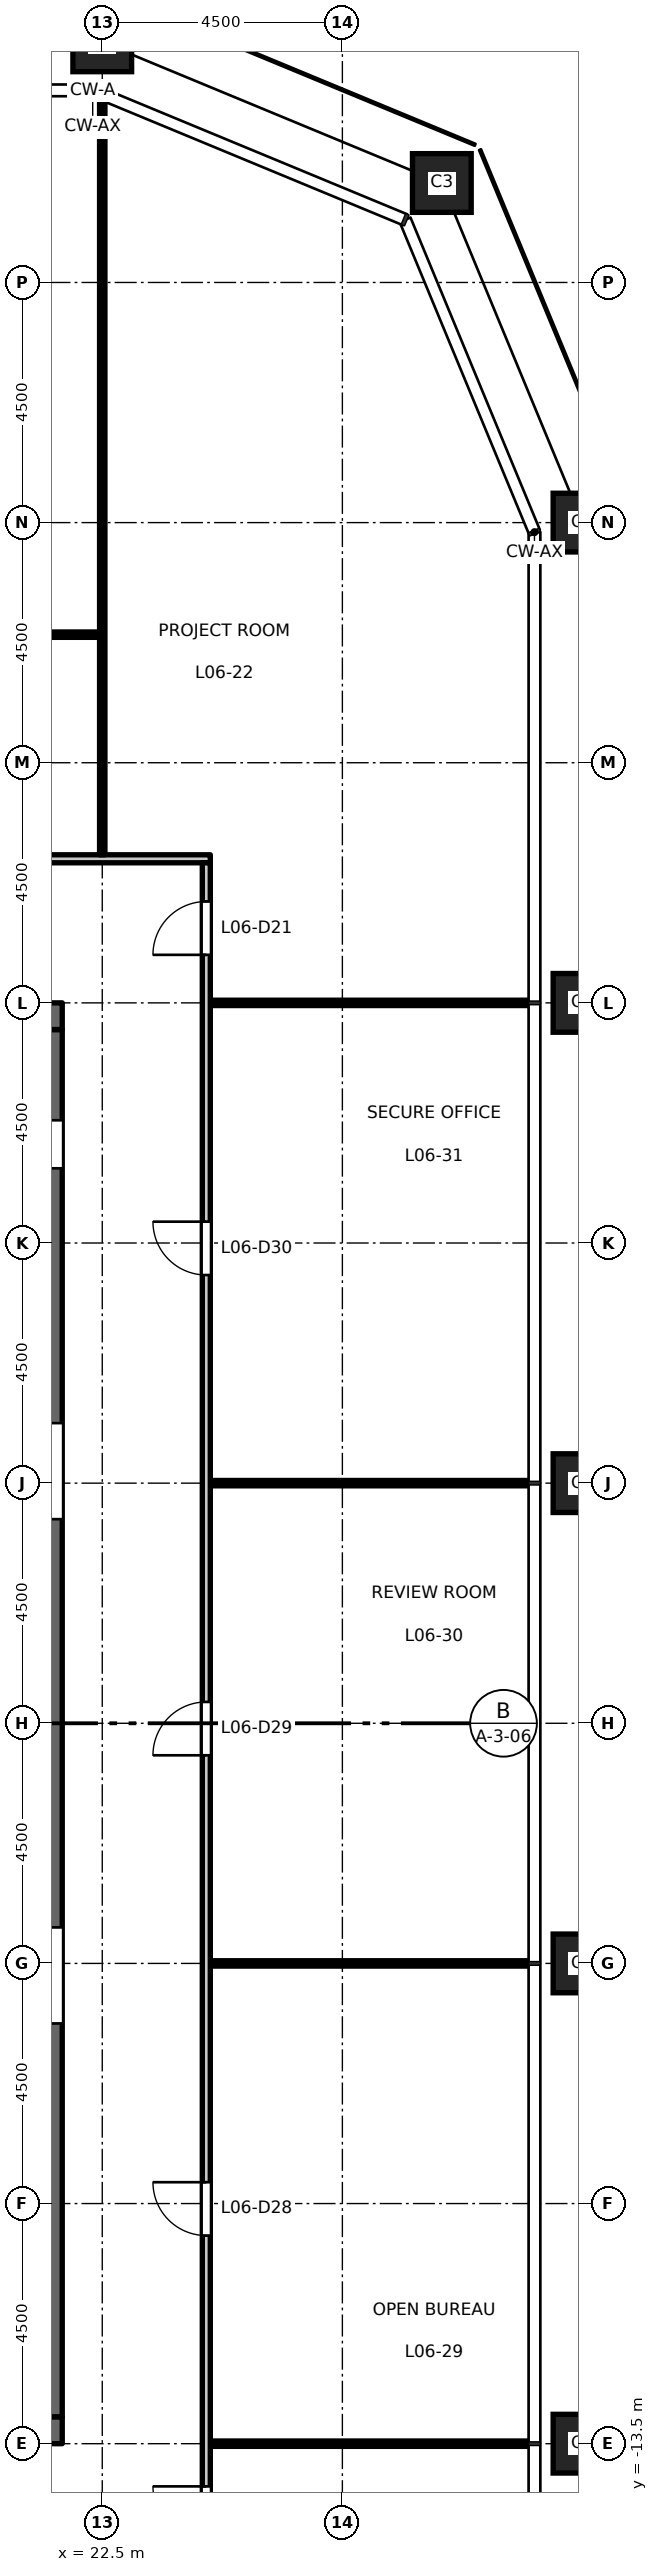
"""IFC4 building model, lengths in metres.
Left out: names, types, materials, properties, quantities, classifications, styles, units other than length and angle.
Written with IfcOpenShell. Run it as: python <this file> out.ifc"""

import sys

from ifc_helpers import new_model, si_unit, direction, frame, frame_2d, origin, origin_2d, place, context, subcontext, project, spatial, rectangle, hollow_rectangle, extrude, element, fill, save


model = new_model("IFC4")
c1 = context("Model", 3, precision=1e-05, world=origin(), true_north=direction((0.0, 1.0)))
c2 = subcontext(c1, "Body", "Model", "MODEL_VIEW")
j1 = project(units=[si_unit("LENGTHUNIT", "METRE"), si_unit("PLANEANGLEUNIT", "RADIAN")], contexts=[c1])
p1 = place(None, origin())
s1 = spatial("IfcSite", under=j1, at=p1, CompositionType="ELEMENT")
p2 = place(p1, origin())
s2 = spatial("IfcBuilding", under=s1, at=p2, CompositionType="ELEMENT")
p3 = place(p2, frame((0.0, 0.0, 31.2)))
s3 = spatial("IfcBuildingStorey", under=s2, at=p3, CompositionType="ELEMENT", Elevation=31.2)
for number, where, z_axis, x_axis in (
    (1, (31.5, -13.5, 0.0), (0.0, 0.0, 1.0), (1.0, 0.0, 0.0)),
    (2, (31.5, -4.5, 0.0), (0.0, 0.0, 1.0), (1.0, 0.0, 0.0)),
    (3, (31.5, 4.5, 0.0), (0.0, 0.0, 1.0), (1.0, 0.0, 0.0)),
    (4, (31.5, 13.5, 0.0), (0.0, 0.0, 1.0), (1.0, 0.0, 0.0)),
    (5, (31.5, 22.5, 0.0), (0.0, 0.0, 1.0), (1.0, 0.0, 0.0)),
    (6, (28.864, 28.864, 0.0), (0.0, 0.0, 1.0), (1.0, 0.0, 0.0)),
    (7, (22.5, 31.5, 0.0), (0.0, 0.0, 1.0), (1.0, 0.0, 0.0)),
):
    element("IfcColumn", number, at=place(p3, frame(where, z_axis=z_axis, x_axis=x_axis)), inside=s3, PredefinedType="COLUMN", context=c2, shape_type="SweptSolid", body=[
        extrude(hollow_rectangle(XDim=1.1, YDim=1.1, WallThickness=0.07, at=origin_2d()), origin(), (0.0, 0.0, 1.0), 4.5),
    ])
p4 = place(p3, frame((21.5, -13.0, 0.0), z_axis=(0.0, 0.0, 1.0), x_axis=(0.0, 1.0, 0.0)))
e8 = element("IfcWall", 8, at=p4, inside=s3, PredefinedType="SHEAR", context=c2, shape_type="SweptSolid", body=[
    extrude(rectangle(XDim=26.0, YDim=0.5, at=frame_2d((13.0, 0.0))), origin(), (0.0, 0.0, 1.0), 4.35),
])
p5 = place(p4, frame((16.825, 0.0, 0.0)))
e9 = element("IfcOpeningElement", 9, at=p5, cuts=e8, PredefinedType="OPENING", context=c2, shape_type="SweptSolid", body=[
    extrude(rectangle(XDim=1.8, YDim=2.1, at=frame_2d((0.9, 1.05))), frame((0.0, 0.26, 0.0), z_axis=(0.0, -1.0, 0.0), x_axis=(1.0, 0.0, 0.0)), (0.0, 0.0, 1.0), 0.52),
])
p6 = place(p4, frame((7.375, 0.0, 0.0)))
e10 = element("IfcOpeningElement", 10, at=p6, cuts=e8, PredefinedType="OPENING", context=c2, shape_type="SweptSolid", body=[
    extrude(rectangle(XDim=1.8, YDim=2.1, at=frame_2d((0.9, 1.05))), frame((0.0, 0.26, 0.0), z_axis=(0.0, -1.0, 0.0), x_axis=(1.0, 0.0, 0.0)), (0.0, 0.0, 1.0), 0.52),
])
p7 = place(p4, frame((23.4, 0.0, 0.0)))
e11 = element("IfcOpeningElement", 11, at=p7, cuts=e8, PredefinedType="OPENING", context=c2, shape_type="SweptSolid", body=[
    extrude(rectangle(XDim=0.9, YDim=2.1, at=frame_2d((0.45, 1.05))), frame((0.0, 0.26, 0.0), z_axis=(0.0, -1.0, 0.0), x_axis=(1.0, 0.0, 0.0)), (0.0, 0.0, 1.0), 0.52),
])
for number, where, z_axis, x_axis in (
    (12, (8.25, 13.25, 0.0), (0.0, 0.0, 1.0), (1.0, 0.0, 0.0)),
    (13, (8.25, -13.25, 0.0), (0.0, 0.0, 1.0), (1.0, 0.0, 0.0)),
):
    element("IfcWall", number, at=place(p3, frame(where, z_axis=z_axis, x_axis=x_axis)), inside=s3, PredefinedType="SHEAR", context=c2, shape_type="SweptSolid", body=[
        extrude(rectangle(XDim=13.5, YDim=0.5, at=frame_2d((6.75, 0.0))), origin(), (0.0, 0.0, 1.0), 4.35),
    ])
p8 = place(p3, frame((24.525, -13.5, 0.0), z_axis=(0.0, 0.0, 1.0), x_axis=(1.0, 0.0, 0.0)))
e14 = element("IfcWall", 14, at=p8, inside=s3, PredefinedType="PARTITIONING", context=c2, shape_type="SweptSolid", body=[
    extrude(rectangle(XDim=5.985, YDim=0.1, at=frame_2d((2.993, 0.0))), origin(), (0.0, 0.0, 1.0), 3.35),
])
for number, where, z_axis, x_axis in (
    (15, (24.525, -4.5, 0.0), (0.0, 0.0, 1.0), (1.0, 0.0, 0.0)),
    (16, (24.525, 4.5, 0.0), (0.0, 0.0, 1.0), (1.0, 0.0, 0.0)),
):
    element("IfcWall", number, at=place(p3, frame(where, z_axis=z_axis, x_axis=x_axis)), inside=s3, PredefinedType="PARTITIONING", context=c2, shape_type="SweptSolid", body=[
        extrude(rectangle(XDim=5.985, YDim=0.1, at=frame_2d((2.993, 0.0))), origin(), (0.0, 0.0, 1.0), 4.35),
    ])
p9 = place(p3, frame((24.525, 13.5, 0.0), z_axis=(0.0, 0.0, 1.0), x_axis=(1.0, 0.0, 0.0)))
e17 = element("IfcWall", 17, at=p9, inside=s3, PredefinedType="PARTITIONING", context=c2, shape_type="SweptSolid", body=[
    extrude(rectangle(XDim=5.985, YDim=0.1, at=frame_2d((2.993, 0.0))), origin(), (0.0, 0.0, 1.0), 3.35),
])
p10 = place(p3, frame((-24.525, 16.2, 0.0), z_axis=(0.0, 0.0, 1.0), x_axis=(1.0, 0.0, 0.0)))
e18 = element("IfcWall", 18, at=p10, inside=s3, PredefinedType="PARTITIONING", context=c2, shape_type="SweptSolid", body=[
    extrude(rectangle(XDim=49.05, YDim=0.15, at=frame_2d((24.525, 0.0))), origin(), (0.0, 0.0, 1.0), 4.35),
])
p11 = place(p10, frame((6.125, 0.0, 0.0)))
e19 = element("IfcOpeningElement", 19, at=p11, cuts=e18, PredefinedType="OPENING", context=c2, shape_type="SweptSolid", body=[
    extrude(rectangle(XDim=1.0, YDim=2.1, at=frame_2d((0.5, 1.05))), frame((0.0, 0.085, 0.0), z_axis=(0.0, -1.0, 0.0), x_axis=(1.0, 0.0, 0.0)), (0.0, 0.0, 1.0), 0.17),
])
p12 = place(p10, frame((15.125, 0.0, 0.0)))
e20 = element("IfcOpeningElement", 20, at=p12, cuts=e18, PredefinedType="OPENING", context=c2, shape_type="SweptSolid", body=[
    extrude(rectangle(XDim=1.0, YDim=2.1, at=frame_2d((0.5, 1.05))), frame((0.0, 0.085, 0.0), z_axis=(0.0, -1.0, 0.0), x_axis=(1.0, 0.0, 0.0)), (0.0, 0.0, 1.0), 0.17),
])
p13 = place(p10, frame((24.125, 0.0, 0.0)))
e21 = element("IfcOpeningElement", 21, at=p13, cuts=e18, PredefinedType="OPENING", context=c2, shape_type="SweptSolid", body=[
    extrude(rectangle(XDim=1.0, YDim=2.1, at=frame_2d((0.5, 1.05))), frame((0.0, 0.085, 0.0), z_axis=(0.0, -1.0, 0.0), x_axis=(1.0, 0.0, 0.0)), (0.0, 0.0, 1.0), 0.17),
])
p14 = place(p10, frame((33.125, 0.0, 0.0)))
e22 = element("IfcOpeningElement", 22, at=p14, cuts=e18, PredefinedType="OPENING", context=c2, shape_type="SweptSolid", body=[
    extrude(rectangle(XDim=1.0, YDim=2.1, at=frame_2d((0.5, 1.05))), frame((0.0, 0.085, 0.0), z_axis=(0.0, -1.0, 0.0), x_axis=(1.0, 0.0, 0.0)), (0.0, 0.0, 1.0), 0.17),
])
p15 = place(p10, frame((42.125, 0.0, 0.0)))
e23 = element("IfcOpeningElement", 23, at=p15, cuts=e18, PredefinedType="OPENING", context=c2, shape_type="SweptSolid", body=[
    extrude(rectangle(XDim=1.0, YDim=2.1, at=frame_2d((0.5, 1.05))), frame((0.0, 0.085, 0.0), z_axis=(0.0, -1.0, 0.0), x_axis=(1.0, 0.0, 0.0)), (0.0, 0.0, 1.0), 0.17),
])
p16 = place(p3, frame((4.55, 20.4, 0.0), z_axis=(0.0, 0.0, 1.0), x_axis=(1.0, 0.0, 0.0)))
e24 = element("IfcWall", 24, at=p16, inside=s3, PredefinedType="PARTITIONING", context=c2, shape_type="SweptSolid", body=[
    extrude(rectangle(XDim=17.9, YDim=0.1, at=frame_2d((8.95, 0.0))), origin(), (0.0, 0.0, 1.0), 4.35),
])
p17 = place(p16, frame((4.05, 0.0, 0.0)))
e25 = element("IfcOpeningElement", 25, at=p17, cuts=e24, PredefinedType="OPENING", context=c2, shape_type="SweptSolid", body=[
    extrude(rectangle(XDim=1.0, YDim=2.1, at=frame_2d((0.5, 1.05))), frame((0.0, 0.06, 0.0), z_axis=(0.0, -1.0, 0.0), x_axis=(1.0, 0.0, 0.0)), (0.0, 0.0, 1.0), 0.12),
])
p18 = place(p16, frame((13.05, 0.0, 0.0)))
e26 = element("IfcOpeningElement", 26, at=p18, cuts=e24, PredefinedType="OPENING", context=c2, shape_type="SweptSolid", body=[
    extrude(rectangle(XDim=1.0, YDim=2.1, at=frame_2d((0.5, 1.05))), frame((0.0, 0.06, 0.0), z_axis=(0.0, -1.0, 0.0), x_axis=(1.0, 0.0, 0.0)), (0.0, 0.0, 1.0), 0.12),
])
p19 = place(p3, frame((22.5, 16.275, 0.0), z_axis=(0.0, 0.0, 1.0), x_axis=(0.0, 1.0, 0.0)))
e27 = element("IfcWall", 27, at=p19, inside=s3, PredefinedType="PARTITIONING", context=c2, shape_type="SweptSolid", body=[
    extrude(rectangle(XDim=14.153, YDim=0.1, at=frame_2d((7.077, 0.0))), origin(), (0.0, 0.0, 1.0), 3.35),
])
p20 = place(p3, frame((24.45, -16.125, 0.0), z_axis=(0.0, 0.0, 1.0), x_axis=(0.0, 1.0, 0.0)))
e28 = element("IfcWall", 28, at=p20, inside=s3, PredefinedType="PARTITIONING", context=c2, shape_type="SweptSolid", body=[
    extrude(rectangle(XDim=32.25, YDim=0.15, at=frame_2d((16.125, 0.0))), origin(), (0.0, 0.0, 1.0), 4.35),
])
p21 = place(p20, frame((30.525, 0.0, 0.0)))
e29 = element("IfcOpeningElement", 29, at=p21, cuts=e28, PredefinedType="OPENING", context=c2, shape_type="SweptSolid", body=[
    extrude(rectangle(XDim=1.0, YDim=2.1, at=frame_2d((0.5, 1.05))), frame((0.0, 0.085, 0.0), z_axis=(0.0, -1.0, 0.0), x_axis=(1.0, 0.0, 0.0)), (0.0, 0.0, 1.0), 0.17),
])
p22 = place(p20, frame((0.825, 0.0, 0.0)))
e30 = element("IfcOpeningElement", 30, at=p22, cuts=e28, PredefinedType="OPENING", context=c2, shape_type="SweptSolid", body=[
    extrude(rectangle(XDim=1.0, YDim=2.1, at=frame_2d((0.5, 1.05))), frame((0.0, 0.085, 0.0), z_axis=(0.0, -1.0, 0.0), x_axis=(1.0, 0.0, 0.0)), (0.0, 0.0, 1.0), 0.17),
])
p23 = place(p20, frame((6.525, 0.0, 0.0)))
e31 = element("IfcOpeningElement", 31, at=p23, cuts=e28, PredefinedType="OPENING", context=c2, shape_type="SweptSolid", body=[
    extrude(rectangle(XDim=1.0, YDim=2.1, at=frame_2d((0.5, 1.05))), frame((0.0, 0.085, 0.0), z_axis=(0.0, -1.0, 0.0), x_axis=(1.0, 0.0, 0.0)), (0.0, 0.0, 1.0), 0.17),
])
p24 = place(p20, frame((15.525, 0.0, 0.0)))
e32 = element("IfcOpeningElement", 32, at=p24, cuts=e28, PredefinedType="OPENING", context=c2, shape_type="SweptSolid", body=[
    extrude(rectangle(XDim=1.0, YDim=2.1, at=frame_2d((0.5, 1.05))), frame((0.0, 0.085, 0.0), z_axis=(0.0, -1.0, 0.0), x_axis=(1.0, 0.0, 0.0)), (0.0, 0.0, 1.0), 0.17),
])
p25 = place(p20, frame((24.525, 0.0, 0.0)))
e33 = element("IfcOpeningElement", 33, at=p25, cuts=e28, PredefinedType="OPENING", context=c2, shape_type="SweptSolid", body=[
    extrude(rectangle(XDim=1.0, YDim=2.1, at=frame_2d((0.5, 1.05))), frame((0.0, 0.085, 0.0), z_axis=(0.0, -1.0, 0.0), x_axis=(1.0, 0.0, 0.0)), (0.0, 0.0, 1.0), 0.17),
])
p26 = place(p21, origin())
e34 = element("IfcDoor", 34, at=p26, inside=s3, OperationType="SINGLE_SWING_LEFT", PredefinedType="DOOR", context=c2, shape_type="SweptSolid", body=[
    extrude(rectangle(XDim=1.0, YDim=2.1, at=frame_2d((0.5, 1.05))), frame((0.0, 0.025, 0.0), z_axis=(0.0, -1.0, 0.0), x_axis=(1.0, 0.0, 0.0)), (0.0, 0.0, 1.0), 0.05),
])
fill(e29, e34)
p27 = place(p22, origin())
e35 = element("IfcDoor", 35, at=p27, inside=s3, OperationType="SINGLE_SWING_RIGHT", PredefinedType="DOOR", context=c2, shape_type="SweptSolid", body=[
    extrude(rectangle(XDim=1.0, YDim=2.1, at=frame_2d((0.5, 1.05))), frame((0.0, 0.025, 0.0), z_axis=(0.0, -1.0, 0.0), x_axis=(1.0, 0.0, 0.0)), (0.0, 0.0, 1.0), 0.05),
])
fill(e30, e35)
p28 = place(p23, origin())
e36 = element("IfcDoor", 36, at=p28, inside=s3, OperationType="SINGLE_SWING_RIGHT", PredefinedType="DOOR", context=c2, shape_type="SweptSolid", body=[
    extrude(rectangle(XDim=1.0, YDim=2.1, at=frame_2d((0.5, 1.05))), frame((0.0, 0.025, 0.0), z_axis=(0.0, -1.0, 0.0), x_axis=(1.0, 0.0, 0.0)), (0.0, 0.0, 1.0), 0.05),
])
fill(e31, e36)
p29 = place(p24, origin())
e37 = element("IfcDoor", 37, at=p29, inside=s3, OperationType="SINGLE_SWING_LEFT", PredefinedType="DOOR", context=c2, shape_type="SweptSolid", body=[
    extrude(rectangle(XDim=1.0, YDim=2.1, at=frame_2d((0.5, 1.05))), frame((0.0, 0.025, 0.0), z_axis=(0.0, -1.0, 0.0), x_axis=(1.0, 0.0, 0.0)), (0.0, 0.0, 1.0), 0.05),
])
fill(e32, e37)
p30 = place(p25, origin())
e38 = element("IfcDoor", 38, at=p30, inside=s3, OperationType="SINGLE_SWING_RIGHT", PredefinedType="DOOR", context=c2, shape_type="SweptSolid", body=[
    extrude(rectangle(XDim=1.0, YDim=2.1, at=frame_2d((0.5, 1.05))), frame((0.0, 0.025, 0.0), z_axis=(0.0, -1.0, 0.0), x_axis=(1.0, 0.0, 0.0)), (0.0, 0.0, 1.0), 0.05),
])
fill(e33, e38)
save(model, sys.argv[1])
